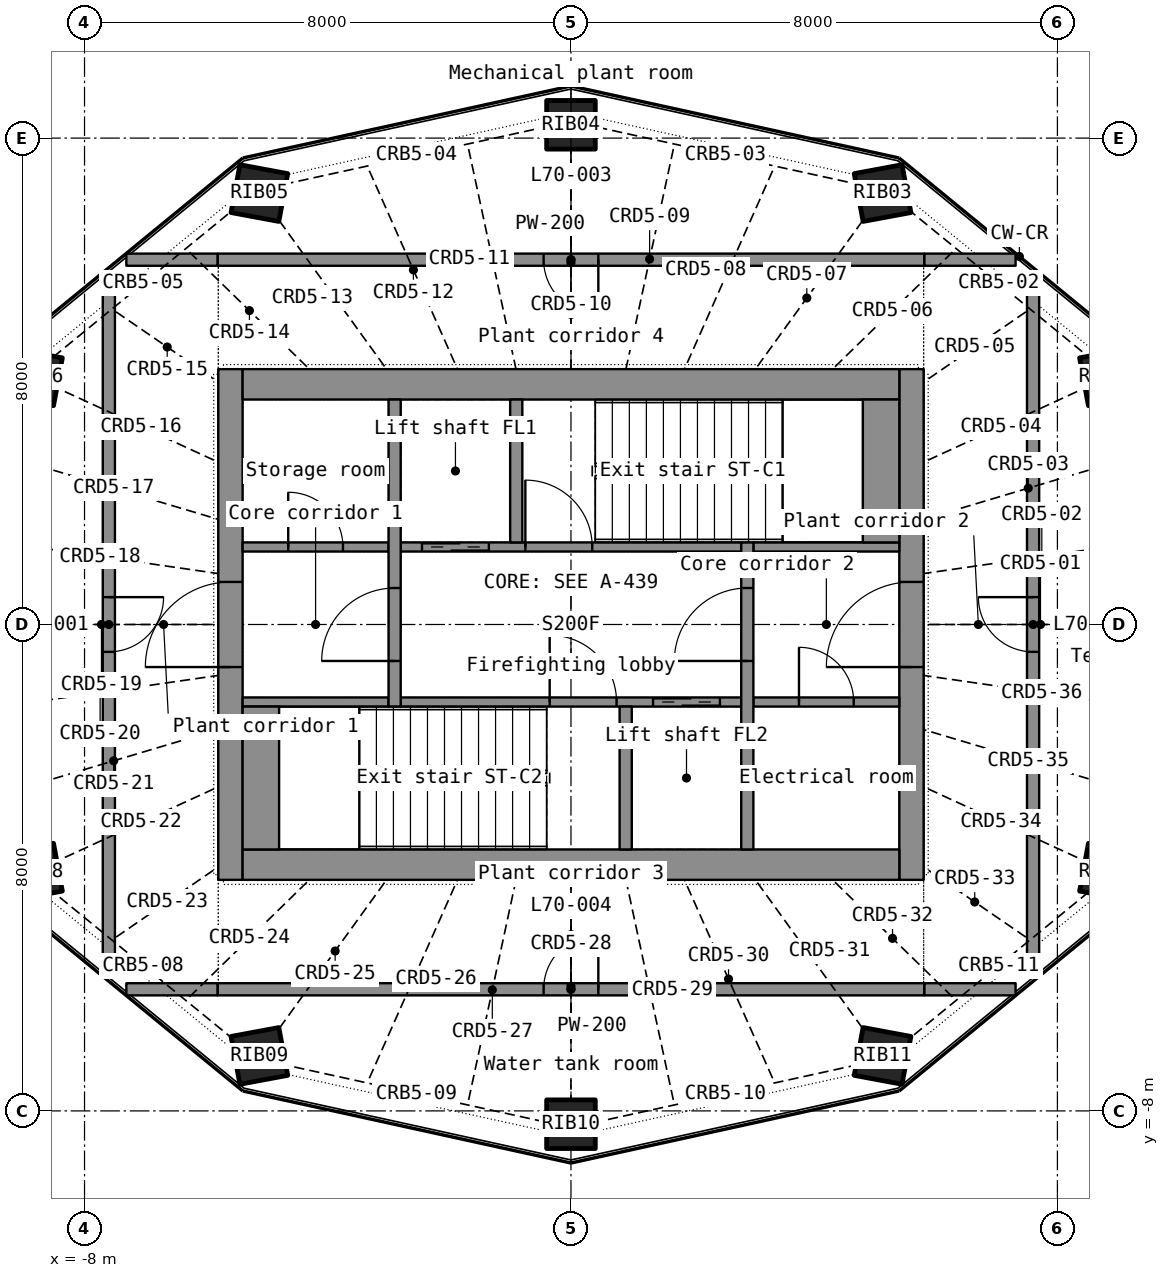
"""IFC4 building model, lengths in metres.
Left out: names, types, materials, properties, quantities, classifications, styles, units other than length and angle.
Written with IfcOpenShell. Run it as: python <this file> out.ifc"""

import sys

from ifc_helpers import new_model, si_unit, direction, frame, frame_2d, origin, origin_2d, place, context, subcontext, project, spatial, rectangle, hollow_rectangle, extrude, element, fill, save


model = new_model("IFC4")
c1 = context("Model", 3, precision=1e-05, world=origin(), true_north=direction((0.0, 1.0)))
c2 = subcontext(c1, "Body", "Model", "MODEL_VIEW")
j1 = project(units=[si_unit("LENGTHUNIT", "METRE"), si_unit("PLANEANGLEUNIT", "RADIAN")], contexts=[c1])
p1 = place(None, origin())
s1 = spatial("IfcSite", under=j1, at=p1, CompositionType="ELEMENT")
p2 = place(p1, origin())
s2 = spatial("IfcBuilding", under=s1, at=p2, CompositionType="ELEMENT")
p3 = place(p2, frame((0.0, 0.0, 288.2)))
s3 = spatial("IfcBuildingStorey", under=s2, at=p3, CompositionType="ELEMENT", Elevation=288.2)
p4 = place(p3, frame((8.831, 4.065, 0.0), z_axis=(-0.11908856, -0.054796873, 0.991370374), x_axis=(0.574592794, -0.818093207, 0.023803898)))
e1 = element("IfcColumn", 1, at=p4, inside=s3, PredefinedType="COLUMN", context=c2, shape_type="SweptSolid", body=[
    extrude(hollow_rectangle(XDim=0.8, YDim=0.8, WallThickness=0.025, at=origin_2d()), origin(), (0.0, 0.0, 1.0), 3.934),
])
p5 = place(p3, frame((5.125, 7.095, 0.0), z_axis=(-0.069182879, -0.095849056, 0.992988765), x_axis=(0.90338224, -0.42829199, 0.021598634)))
e2 = element("IfcColumn", 2, at=p5, inside=s3, PredefinedType="COLUMN", context=c2, shape_type="SweptSolid", body=[
    extrude(hollow_rectangle(XDim=0.8, YDim=0.8, WallThickness=0.025, at=origin_2d()), origin(), (0.0, 0.0, 1.0), 3.928),
])
p6 = place(p3, frame((0.0, 8.219, 0.0), z_axis=(0.0, -0.111046025, 0.993815265), x_axis=(1.0, 0.0, 0.0)))
e3 = element("IfcColumn", 3, at=p6, inside=s3, PredefinedType="COLUMN", context=c2, shape_type="SweptSolid", body=[
    extrude(hollow_rectangle(XDim=0.8, YDim=0.8, WallThickness=0.025, at=origin_2d()), origin(), (0.0, 0.0, 1.0), 3.924),
])
p7 = place(p3, frame((-5.125, 7.095, 0.0), z_axis=(0.069182879, -0.095849056, 0.992988765), x_axis=(0.90338224, 0.42829199, -0.021598634)))
e4 = element("IfcColumn", 4, at=p7, inside=s3, PredefinedType="COLUMN", context=c2, shape_type="SweptSolid", body=[
    extrude(hollow_rectangle(XDim=0.8, YDim=0.8, WallThickness=0.025, at=origin_2d()), origin(), (0.0, 0.0, 1.0), 3.928),
])
for number, where, z_axis, x_axis in (
    (5, (-8.831, 4.065, 0.0), (0.119, -0.055, 0.991), (0.575, 0.818, -0.024)),
    (6, (-8.831, -4.065, 0.0), (0.119, 0.055, 0.991), (-0.575, 0.818, 0.024)),
):
    element("IfcColumn", number, at=place(p3, frame(where, z_axis=z_axis, x_axis=x_axis)), inside=s3, PredefinedType="COLUMN", context=c2, shape_type="SweptSolid", body=[
        extrude(hollow_rectangle(XDim=0.8, YDim=0.8, WallThickness=0.025, at=origin_2d()), origin(), (0.0, 0.0, 1.0), 3.934),
    ])
p8 = place(p3, frame((-5.125, -7.095, 0.0), z_axis=(0.069182879, 0.095849056, 0.992988765), x_axis=(-0.90338224, 0.42829199, 0.021598634)))
e7 = element("IfcColumn", 7, at=p8, inside=s3, PredefinedType="COLUMN", context=c2, shape_type="SweptSolid", body=[
    extrude(hollow_rectangle(XDim=0.8, YDim=0.8, WallThickness=0.025, at=origin_2d()), origin(), (0.0, 0.0, 1.0), 3.928),
])
p9 = place(p3, frame((0.0, -8.219, 0.0), z_axis=(0.0, 0.111046025, 0.993815265), x_axis=(-1.0, 0.0, 0.0)))
e8 = element("IfcColumn", 8, at=p9, inside=s3, PredefinedType="COLUMN", context=c2, shape_type="SweptSolid", body=[
    extrude(hollow_rectangle(XDim=0.8, YDim=0.8, WallThickness=0.025, at=origin_2d()), origin(), (0.0, 0.0, 1.0), 3.924),
])
p10 = place(p3, frame((5.125, -7.095, 0.0), z_axis=(-0.069182879, 0.095849056, 0.992988765), x_axis=(-0.90338224, -0.42829199, -0.021598634)))
e9 = element("IfcColumn", 9, at=p10, inside=s3, PredefinedType="COLUMN", context=c2, shape_type="SweptSolid", body=[
    extrude(hollow_rectangle(XDim=0.8, YDim=0.8, WallThickness=0.025, at=origin_2d()), origin(), (0.0, 0.0, 1.0), 3.928),
])
p11 = place(p3, frame((8.831, -4.065, 0.0), z_axis=(-0.11908856, 0.054796873, 0.991370374), x_axis=(-0.574592794, -0.818093207, -0.023803898)))
e10 = element("IfcColumn", 10, at=p11, inside=s3, PredefinedType="COLUMN", context=c2, shape_type="SweptSolid", body=[
    extrude(hollow_rectangle(XDim=0.8, YDim=0.8, WallThickness=0.025, at=origin_2d()), origin(), (0.0, 0.0, 1.0), 3.934),
])
p12 = place(p3, frame((-5.6, -4.2, 0.0), z_axis=(0.0, 0.0, 1.0), x_axis=(0.0, 1.0, 0.0)))
e11 = element("IfcWall", 11, at=p12, inside=s3, PredefinedType="SHEAR", context=c2, shape_type="SweptSolid", body=[
    extrude(rectangle(XDim=8.4, YDim=0.4, at=frame_2d((4.2, 0.0))), origin(), (0.0, 0.0, 1.0), 3.5),
])
p13 = place(p12, frame((3.5, 0.0, 0.0)))
e12 = element("IfcOpeningElement", 12, at=p13, cuts=e11, PredefinedType="OPENING", context=c2, shape_type="SweptSolid", body=[
    extrude(rectangle(XDim=1.4, YDim=2.2, at=frame_2d((0.7, 1.1))), frame((0.0, 0.21, 0.0), z_axis=(0.0, -1.0, 0.0), x_axis=(1.0, 0.0, 0.0)), (0.0, 0.0, 1.0), 0.42),
])
p14 = place(p3, frame((5.6, -4.2, 0.0), z_axis=(0.0, 0.0, 1.0), x_axis=(0.0, 1.0, 0.0)))
e13 = element("IfcWall", 13, at=p14, inside=s3, PredefinedType="SHEAR", context=c2, shape_type="SweptSolid", body=[
    extrude(rectangle(XDim=8.4, YDim=0.4, at=frame_2d((4.2, 0.0))), origin(), (0.0, 0.0, 1.0), 3.5),
])
p15 = place(p14, frame((3.5, 0.0, 0.0)))
e14 = element("IfcOpeningElement", 14, at=p15, cuts=e13, PredefinedType="OPENING", context=c2, shape_type="SweptSolid", body=[
    extrude(rectangle(XDim=1.4, YDim=2.2, at=frame_2d((0.7, 1.1))), frame((0.0, 0.21, 0.0), z_axis=(0.0, -1.0, 0.0), x_axis=(1.0, 0.0, 0.0)), (0.0, 0.0, 1.0), 0.42),
])
for number, where, z_axis, x_axis in (
    (15, (-5.4, -3.95, 0.0), (0.0, 0.0, 1.0), (1.0, 0.0, 0.0)),
    (16, (-5.4, 3.95, 0.0), (0.0, 0.0, 1.0), (1.0, 0.0, 0.0)),
):
    element("IfcWall", number, at=place(p3, frame(where, z_axis=z_axis, x_axis=x_axis)), inside=s3, PredefinedType="SHEAR", context=c2, shape_type="SweptSolid", body=[
        extrude(rectangle(XDim=10.8, YDim=0.5, at=frame_2d((5.4, 0.0))), origin(), (0.0, 0.0, 1.0), 3.5),
    ])
p16 = place(p3, frame((-5.4, -1.275, 0.0), z_axis=(0.0, 0.0, 1.0), x_axis=(1.0, 0.0, 0.0)))
e17 = element("IfcWall", 17, at=p16, inside=s3, PredefinedType="SHEAR", context=c2, shape_type="SweptSolid", body=[
    extrude(rectangle(XDim=2.4, YDim=0.15, at=frame_2d((1.2, 0.0))), origin(), (0.0, 0.0, 1.0), 3.5),
])
p17 = place(p3, frame((-2.8, -1.275, 0.0), z_axis=(0.0, 0.0, 1.0), x_axis=(1.0, 0.0, 0.0)))
e18 = element("IfcWall", 18, at=p17, inside=s3, PredefinedType="SHEAR", context=c2, shape_type="SweptSolid", body=[
    extrude(rectangle(XDim=5.6, YDim=0.15, at=frame_2d((2.8, 0.0))), origin(), (0.0, 0.0, 1.0), 3.5),
])
p18 = place(p17, frame((4.15, 0.0, 0.0)))
e19 = element("IfcOpeningElement", 19, at=p18, cuts=e18, PredefinedType="OPENING", context=c2, shape_type="SweptSolid", body=[
    extrude(rectangle(XDim=1.1, YDim=2.2, at=frame_2d((0.55, 1.1))), frame((0.0, 0.085, 0.0), z_axis=(0.0, -1.0, 0.0), x_axis=(1.0, 0.0, 0.0)), (0.0, 0.0, 1.0), 0.17),
])
p19 = place(p17, frame((2.45, 0.0, 0.0)))
e20 = element("IfcOpeningElement", 20, at=p19, cuts=e18, PredefinedType="OPENING", context=c2, shape_type="SweptSolid", body=[
    extrude(rectangle(XDim=1.1, YDim=2.15, at=frame_2d((0.55, 1.075))), frame((0.0, 0.085, 0.0), z_axis=(0.0, -1.0, 0.0), x_axis=(1.0, 0.0, 0.0)), (0.0, 0.0, 1.0), 0.17),
])
p20 = place(p3, frame((3.0, -1.275, 0.0), z_axis=(0.0, 0.0, 1.0), x_axis=(1.0, 0.0, 0.0)))
e21 = element("IfcWall", 21, at=p20, inside=s3, PredefinedType="PARTITIONING", context=c2, shape_type="SweptSolid", body=[
    extrude(rectangle(XDim=2.4, YDim=0.15, at=frame_2d((1.2, 0.0))), origin(), (0.0, 0.0, 1.0), 3.5),
])
p21 = place(p20, frame((0.75, 0.0, 0.0)))
e22 = element("IfcOpeningElement", 22, at=p21, cuts=e21, PredefinedType="OPENING", context=c2, shape_type="SweptSolid", body=[
    extrude(rectangle(XDim=0.9, YDim=2.1, at=frame_2d((0.45, 1.05))), frame((0.0, 0.085, 0.0), z_axis=(0.0, -1.0, 0.0), x_axis=(1.0, 0.0, 0.0)), (0.0, 0.0, 1.0), 0.17),
])
p22 = place(p3, frame((-5.4, 1.275, 0.0), z_axis=(0.0, 0.0, 1.0), x_axis=(1.0, 0.0, 0.0)))
e23 = element("IfcWall", 23, at=p22, inside=s3, PredefinedType="PARTITIONING", context=c2, shape_type="SweptSolid", body=[
    extrude(rectangle(XDim=2.4, YDim=0.15, at=frame_2d((1.2, 0.0))), origin(), (0.0, 0.0, 1.0), 3.5),
])
p23 = place(p22, frame((0.75, 0.0, 0.0)))
e24 = element("IfcOpeningElement", 24, at=p23, cuts=e23, PredefinedType="OPENING", context=c2, shape_type="SweptSolid", body=[
    extrude(rectangle(XDim=0.9, YDim=2.1, at=frame_2d((0.45, 1.05))), frame((0.0, 0.085, 0.0), z_axis=(0.0, -1.0, 0.0), x_axis=(1.0, 0.0, 0.0)), (0.0, 0.0, 1.0), 0.17),
])
p24 = place(p3, frame((-2.8, 1.275, 0.0), z_axis=(0.0, 0.0, 1.0), x_axis=(1.0, 0.0, 0.0)))
e25 = element("IfcWall", 25, at=p24, inside=s3, PredefinedType="SHEAR", context=c2, shape_type="SweptSolid", body=[
    extrude(rectangle(XDim=5.6, YDim=0.15, at=frame_2d((2.8, 0.0))), origin(), (0.0, 0.0, 1.0), 3.5),
])
p25 = place(p24, frame((0.35, 0.0, 0.0)))
e26 = element("IfcOpeningElement", 26, at=p25, cuts=e25, PredefinedType="OPENING", context=c2, shape_type="SweptSolid", body=[
    extrude(rectangle(XDim=1.1, YDim=2.2, at=frame_2d((0.55, 1.1))), frame((0.0, 0.085, 0.0), z_axis=(0.0, -1.0, 0.0), x_axis=(1.0, 0.0, 0.0)), (0.0, 0.0, 1.0), 0.17),
])
p26 = place(p24, frame((2.05, 0.0, 0.0)))
e27 = element("IfcOpeningElement", 27, at=p26, cuts=e25, PredefinedType="OPENING", context=c2, shape_type="SweptSolid", body=[
    extrude(rectangle(XDim=1.1, YDim=2.15, at=frame_2d((0.55, 1.075))), frame((0.0, 0.085, 0.0), z_axis=(0.0, -1.0, 0.0), x_axis=(1.0, 0.0, 0.0)), (0.0, 0.0, 1.0), 0.17),
])
p27 = place(p3, frame((3.0, 1.275, 0.0), z_axis=(0.0, 0.0, 1.0), x_axis=(1.0, 0.0, 0.0)))
e28 = element("IfcWall", 28, at=p27, inside=s3, PredefinedType="SHEAR", context=c2, shape_type="SweptSolid", body=[
    extrude(rectangle(XDim=2.4, YDim=0.15, at=frame_2d((1.2, 0.0))), origin(), (0.0, 0.0, 1.0), 3.5),
])
p28 = place(p3, frame((-2.9, -1.35, 0.0), z_axis=(0.0, 0.0, 1.0), x_axis=(0.0, 1.0, 0.0)))
e29 = element("IfcWall", 29, at=p28, inside=s3, PredefinedType="SHEAR", context=c2, shape_type="SweptSolid", body=[
    extrude(rectangle(XDim=5.05, YDim=0.2, at=frame_2d((2.525, 0.0))), origin(), (0.0, 0.0, 1.0), 3.5),
])
p29 = place(p28, frame((0.75, 0.0, 0.0)))
e30 = element("IfcOpeningElement", 30, at=p29, cuts=e29, PredefinedType="OPENING", context=c2, shape_type="SweptSolid", body=[
    extrude(rectangle(XDim=1.2, YDim=2.2, at=frame_2d((0.6, 1.1))), frame((0.0, 0.11, 0.0), z_axis=(0.0, -1.0, 0.0), x_axis=(1.0, 0.0, 0.0)), (0.0, 0.0, 1.0), 0.22),
])
p30 = place(p3, frame((2.9, -3.7, 0.0), z_axis=(0.0, 0.0, 1.0), x_axis=(0.0, 1.0, 0.0)))
e31 = element("IfcWall", 31, at=p30, inside=s3, PredefinedType="SHEAR", context=c2, shape_type="SweptSolid", body=[
    extrude(rectangle(XDim=5.05, YDim=0.2, at=frame_2d((2.525, 0.0))), origin(), (0.0, 0.0, 1.0), 3.5),
])
p31 = place(p30, frame((3.1, 0.0, 0.0)))
e32 = element("IfcOpeningElement", 32, at=p31, cuts=e31, PredefinedType="OPENING", context=c2, shape_type="SweptSolid", body=[
    extrude(rectangle(XDim=1.2, YDim=2.2, at=frame_2d((0.6, 1.1))), frame((0.0, 0.11, 0.0), z_axis=(0.0, -1.0, 0.0), x_axis=(1.0, 0.0, 0.0)), (0.0, 0.0, 1.0), 0.22),
])
for number, where, z_axis, x_axis in (
    (33, (-0.9, 1.35, 0.0), (0.0, 0.0, 1.0), (0.0, 1.0, 0.0)),
    (34, (0.9, -3.7, 0.0), (0.0, 0.0, 1.0), (0.0, 1.0, 0.0)),
):
    element("IfcWall", number, at=place(p3, frame(where, z_axis=z_axis, x_axis=x_axis)), inside=s3, PredefinedType="SHEAR", context=c2, shape_type="SweptSolid", body=[
        extrude(rectangle(XDim=2.35, YDim=0.2, at=frame_2d((1.175, 0.0))), origin(), (0.0, 0.0, 1.0), 3.5),
    ])
for number, where, z_axis, x_axis in (
    (35, (5.1, 1.35, 0.0), (0.0, 0.0, 1.0), (0.0, 1.0, 0.0)),
    (36, (-5.1, -3.7, 0.0), (0.0, 0.0, 1.0), (0.0, 1.0, 0.0)),
):
    element("IfcWall", number, at=place(p3, frame(where, z_axis=z_axis, x_axis=x_axis)), inside=s3, PredefinedType="SHEAR", context=c2, shape_type="SweptSolid", body=[
        extrude(rectangle(XDim=2.35, YDim=0.6, at=frame_2d((1.175, 0.0))), origin(), (0.0, 0.0, 1.0), 3.5),
    ])
p32 = place(p3, frame((-5.812, -6.0, 0.0), z_axis=(0.0, 0.0, 1.0), x_axis=(1.0, 0.0, 0.0)))
e37 = element("IfcWall", 37, at=p32, inside=s3, PredefinedType="PARTITIONING", context=c2, shape_type="SweptSolid", body=[
    extrude(rectangle(XDim=11.624, YDim=0.2, at=frame_2d((5.812, 0.0))), origin(), (0.0, 0.0, 1.0), 2.9),
])
p33 = place(p32, frame((5.362, 0.0, 0.0)))
e38 = element("IfcOpeningElement", 38, at=p33, cuts=e37, PredefinedType="OPENING", context=c2, shape_type="SweptSolid", body=[
    extrude(rectangle(XDim=0.9, YDim=2.1, at=frame_2d((0.45, 1.05))), frame((0.0, 0.11, 0.0), z_axis=(0.0, -1.0, 0.0), x_axis=(1.0, 0.0, 0.0)), (0.0, 0.0, 1.0), 0.22),
])
p34 = place(p3, frame((5.812, 6.0, 0.0), z_axis=(0.0, 0.0, 1.0), x_axis=(-1.0, 0.0, 0.0)))
e39 = element("IfcWall", 39, at=p34, inside=s3, PredefinedType="PARTITIONING", context=c2, shape_type="SweptSolid", body=[
    extrude(rectangle(XDim=11.624, YDim=0.2, at=frame_2d((5.812, 0.0))), origin(), (0.0, 0.0, 1.0), 2.9),
])
p35 = place(p34, frame((5.362, 0.0, 0.0)))
e40 = element("IfcOpeningElement", 40, at=p35, cuts=e39, PredefinedType="OPENING", context=c2, shape_type="SweptSolid", body=[
    extrude(rectangle(XDim=0.9, YDim=2.1, at=frame_2d((0.45, 1.05))), frame((0.0, 0.11, 0.0), z_axis=(0.0, -1.0, 0.0), x_axis=(1.0, 0.0, 0.0)), (0.0, 0.0, 1.0), 0.22),
])
p36 = place(p3, frame((7.6, -5.755, 0.0), z_axis=(0.0, 0.0, 1.0), x_axis=(0.0, 1.0, 0.0)))
e41 = element("IfcWall", 41, at=p36, inside=s3, PredefinedType="PARTITIONING", context=c2, shape_type="SweptSolid", body=[
    extrude(rectangle(XDim=11.511, YDim=0.2, at=frame_2d((5.755, 0.0))), origin(), (0.0, 0.0, 1.0), 2.9),
])
p37 = place(p36, frame((5.305, 0.0, 0.0)))
e42 = element("IfcOpeningElement", 42, at=p37, cuts=e41, PredefinedType="OPENING", context=c2, shape_type="SweptSolid", body=[
    extrude(rectangle(XDim=0.9, YDim=2.1, at=frame_2d((0.45, 1.05))), frame((0.0, 0.11, 0.0), z_axis=(0.0, -1.0, 0.0), x_axis=(1.0, 0.0, 0.0)), (0.0, 0.0, 1.0), 0.22),
])
p38 = place(p3, frame((-7.6, 5.755, 0.0), z_axis=(0.0, 0.0, 1.0), x_axis=(0.0, -1.0, 0.0)))
e43 = element("IfcWall", 43, at=p38, inside=s3, PredefinedType="PARTITIONING", context=c2, shape_type="SweptSolid", body=[
    extrude(rectangle(XDim=11.511, YDim=0.2, at=frame_2d((5.755, 0.0))), origin(), (0.0, 0.0, 1.0), 2.9),
])
p39 = place(p38, frame((5.305, 0.0, 0.0)))
e44 = element("IfcOpeningElement", 44, at=p39, cuts=e43, PredefinedType="OPENING", context=c2, shape_type="SweptSolid", body=[
    extrude(rectangle(XDim=0.9, YDim=2.1, at=frame_2d((0.45, 1.05))), frame((0.0, 0.11, 0.0), z_axis=(0.0, -1.0, 0.0), x_axis=(1.0, 0.0, 0.0)), (0.0, 0.0, 1.0), 0.22),
])
for number, where, z_axis, x_axis in (
    (45, (-7.312, -6.0, 0.0), (0.0, 0.0, 1.0), (1.0, 0.0, 0.0)),
    (46, (5.813, -6.0, 0.0), (0.0, 0.0, 1.0), (1.0, 0.0, 0.0)),
    (47, (7.312, 6.0, 0.0), (0.0, 0.0, 1.0), (-1.0, 0.0, 0.0)),
):
    element("IfcWall", number, at=place(p3, frame(where, z_axis=z_axis, x_axis=x_axis)), inside=s3, PredefinedType="PARTITIONING", context=c2, shape_type="SweptSolid", body=[
        extrude(rectangle(XDim=1.5, YDim=0.2, at=frame_2d((0.75, 0.0))), origin(), (0.0, 0.0, 1.0), 2.9),
    ])
p40 = place(p3, frame((-5.813, 6.0, 0.0), z_axis=(0.0, 0.0, 1.0), x_axis=(-1.0, 0.0, 0.0)))
e48 = element("IfcWall", 48, at=p40, inside=s3, PredefinedType="PARTITIONING", context=c2, shape_type="SweptSolid", body=[
    extrude(rectangle(XDim=1.499, YDim=0.2, at=frame_2d((0.75, 0.0))), origin(), (0.0, 0.0, 1.0), 2.9),
])
p41 = place(p13, origin())
e49 = element("IfcDoor", 49, at=p41, inside=s3, OperationType="DOUBLE_DOOR_SINGLE_SWING", PredefinedType="DOOR", context=c2, shape_type="SweptSolid", body=[
    extrude(rectangle(XDim=1.4, YDim=2.2, at=frame_2d((0.7, 1.1))), frame((0.0, 0.025, 0.0), z_axis=(0.0, -1.0, 0.0), x_axis=(1.0, 0.0, 0.0)), (0.0, 0.0, 1.0), 0.05),
])
fill(e12, e49)
p42 = place(p15, origin())
e50 = element("IfcDoor", 50, at=p42, inside=s3, OperationType="DOUBLE_DOOR_SINGLE_SWING", PredefinedType="DOOR", context=c2, shape_type="SweptSolid", body=[
    extrude(rectangle(XDim=1.4, YDim=2.2, at=frame_2d((0.7, 1.1))), frame((0.0, 0.025, 0.0), z_axis=(0.0, -1.0, 0.0), x_axis=(1.0, 0.0, 0.0)), (0.0, 0.0, 1.0), 0.05),
])
fill(e14, e50)
p43 = place(p29, origin())
e51 = element("IfcDoor", 51, at=p43, inside=s3, OperationType="SINGLE_SWING_LEFT", PredefinedType="DOOR", context=c2, shape_type="SweptSolid", body=[
    extrude(rectangle(XDim=1.2, YDim=2.2, at=frame_2d((0.6, 1.1))), frame((0.0, 0.025, 0.0), z_axis=(0.0, -1.0, 0.0), x_axis=(1.0, 0.0, 0.0)), (0.0, 0.0, 1.0), 0.05),
])
fill(e30, e51)
p44 = place(p31, origin())
e52 = element("IfcDoor", 52, at=p44, inside=s3, OperationType="SINGLE_SWING_LEFT", PredefinedType="DOOR", context=c2, shape_type="SweptSolid", body=[
    extrude(rectangle(XDim=1.2, YDim=2.2, at=frame_2d((0.6, 1.1))), frame((0.0, 0.025, 0.0), z_axis=(0.0, -1.0, 0.0), x_axis=(1.0, 0.0, 0.0)), (0.0, 0.0, 1.0), 0.05),
])
fill(e32, e52)
p45 = place(p25, origin())
e53 = element("IfcDoor", 53, at=p45, inside=s3, OperationType="DOUBLE_DOOR_SLIDING", PredefinedType="DOOR", context=c2, shape_type="SweptSolid", body=[
    extrude(rectangle(XDim=1.1, YDim=2.2, at=frame_2d((0.55, 1.1))), frame((0.0, 0.025, 0.0), z_axis=(0.0, -1.0, 0.0), x_axis=(1.0, 0.0, 0.0)), (0.0, 0.0, 1.0), 0.05),
])
fill(e26, e53)
p46 = place(p18, origin())
e54 = element("IfcDoor", 54, at=p46, inside=s3, OperationType="DOUBLE_DOOR_SLIDING", PredefinedType="DOOR", context=c2, shape_type="SweptSolid", body=[
    extrude(rectangle(XDim=1.1, YDim=2.2, at=frame_2d((0.55, 1.1))), frame((0.0, 0.025, 0.0), z_axis=(0.0, -1.0, 0.0), x_axis=(1.0, 0.0, 0.0)), (0.0, 0.0, 1.0), 0.05),
])
fill(e19, e54)
p47 = place(p26, origin())
e55 = element("IfcDoor", 55, at=p47, inside=s3, OperationType="SINGLE_SWING_LEFT", PredefinedType="DOOR", context=c2, shape_type="SweptSolid", body=[
    extrude(rectangle(XDim=1.1, YDim=2.15, at=frame_2d((0.55, 1.075))), frame((0.0, 0.025, 0.0), z_axis=(0.0, -1.0, 0.0), x_axis=(1.0, 0.0, 0.0)), (0.0, 0.0, 1.0), 0.05),
])
fill(e27, e55)
p48 = place(p19, origin())
e56 = element("IfcDoor", 56, at=p48, inside=s3, OperationType="SINGLE_SWING_LEFT", PredefinedType="DOOR", context=c2, shape_type="SweptSolid", body=[
    extrude(rectangle(XDim=1.1, YDim=2.15, at=frame_2d((0.55, 1.075))), frame((0.0, 0.025, 0.0), z_axis=(0.0, -1.0, 0.0), x_axis=(1.0, 0.0, 0.0)), (0.0, 0.0, 1.0), 0.05),
])
fill(e20, e56)
p49 = place(p23, origin())
e57 = element("IfcDoor", 57, at=p49, inside=s3, OperationType="SINGLE_SWING_LEFT", PredefinedType="DOOR", context=c2, shape_type="SweptSolid", body=[
    extrude(rectangle(XDim=0.9, YDim=2.1, at=frame_2d((0.45, 1.05))), frame((0.0, 0.025, 0.0), z_axis=(0.0, -1.0, 0.0), x_axis=(1.0, 0.0, 0.0)), (0.0, 0.0, 1.0), 0.05),
])
fill(e24, e57)
p50 = place(p21, origin())
e58 = element("IfcDoor", 58, at=p50, inside=s3, OperationType="SINGLE_SWING_LEFT", PredefinedType="DOOR", context=c2, shape_type="SweptSolid", body=[
    extrude(rectangle(XDim=0.9, YDim=2.1, at=frame_2d((0.45, 1.05))), frame((0.0, 0.025, 0.0), z_axis=(0.0, -1.0, 0.0), x_axis=(1.0, 0.0, 0.0)), (0.0, 0.0, 1.0), 0.05),
])
fill(e22, e58)
p51 = place(p39, origin())
e59 = element("IfcDoor", 59, at=p51, inside=s3, OperationType="SINGLE_SWING_LEFT", PredefinedType="DOOR", context=c2, shape_type="SweptSolid", body=[
    extrude(rectangle(XDim=0.9, YDim=2.1, at=frame_2d((0.45, 1.05))), frame((0.0, 0.025, 0.0), z_axis=(0.0, -1.0, 0.0), x_axis=(1.0, 0.0, 0.0)), (0.0, 0.0, 1.0), 0.05),
])
fill(e44, e59)
p52 = place(p37, origin())
e60 = element("IfcDoor", 60, at=p52, inside=s3, OperationType="SINGLE_SWING_RIGHT", PredefinedType="DOOR", context=c2, shape_type="SweptSolid", body=[
    extrude(rectangle(XDim=0.9, YDim=2.1, at=frame_2d((0.45, 1.05))), frame((0.0, 0.025, 0.0), z_axis=(0.0, -1.0, 0.0), x_axis=(1.0, 0.0, 0.0)), (0.0, 0.0, 1.0), 0.05),
])
fill(e42, e60)
p53 = place(p35, origin())
e61 = element("IfcDoor", 61, at=p53, inside=s3, OperationType="SINGLE_SWING_LEFT", PredefinedType="DOOR", context=c2, shape_type="SweptSolid", body=[
    extrude(rectangle(XDim=0.9, YDim=2.1, at=frame_2d((0.45, 1.05))), frame((0.0, 0.025, 0.0), z_axis=(0.0, -1.0, 0.0), x_axis=(1.0, 0.0, 0.0)), (0.0, 0.0, 1.0), 0.05),
])
fill(e40, e61)
p54 = place(p33, origin())
e62 = element("IfcDoor", 62, at=p54, inside=s3, OperationType="SINGLE_SWING_RIGHT", PredefinedType="DOOR", context=c2, shape_type="SweptSolid", body=[
    extrude(rectangle(XDim=0.9, YDim=2.1, at=frame_2d((0.45, 1.05))), frame((0.0, 0.025, 0.0), z_axis=(0.0, -1.0, 0.0), x_axis=(1.0, 0.0, 0.0)), (0.0, 0.0, 1.0), 0.05),
])
fill(e38, e62)
save(model, sys.argv[1])
